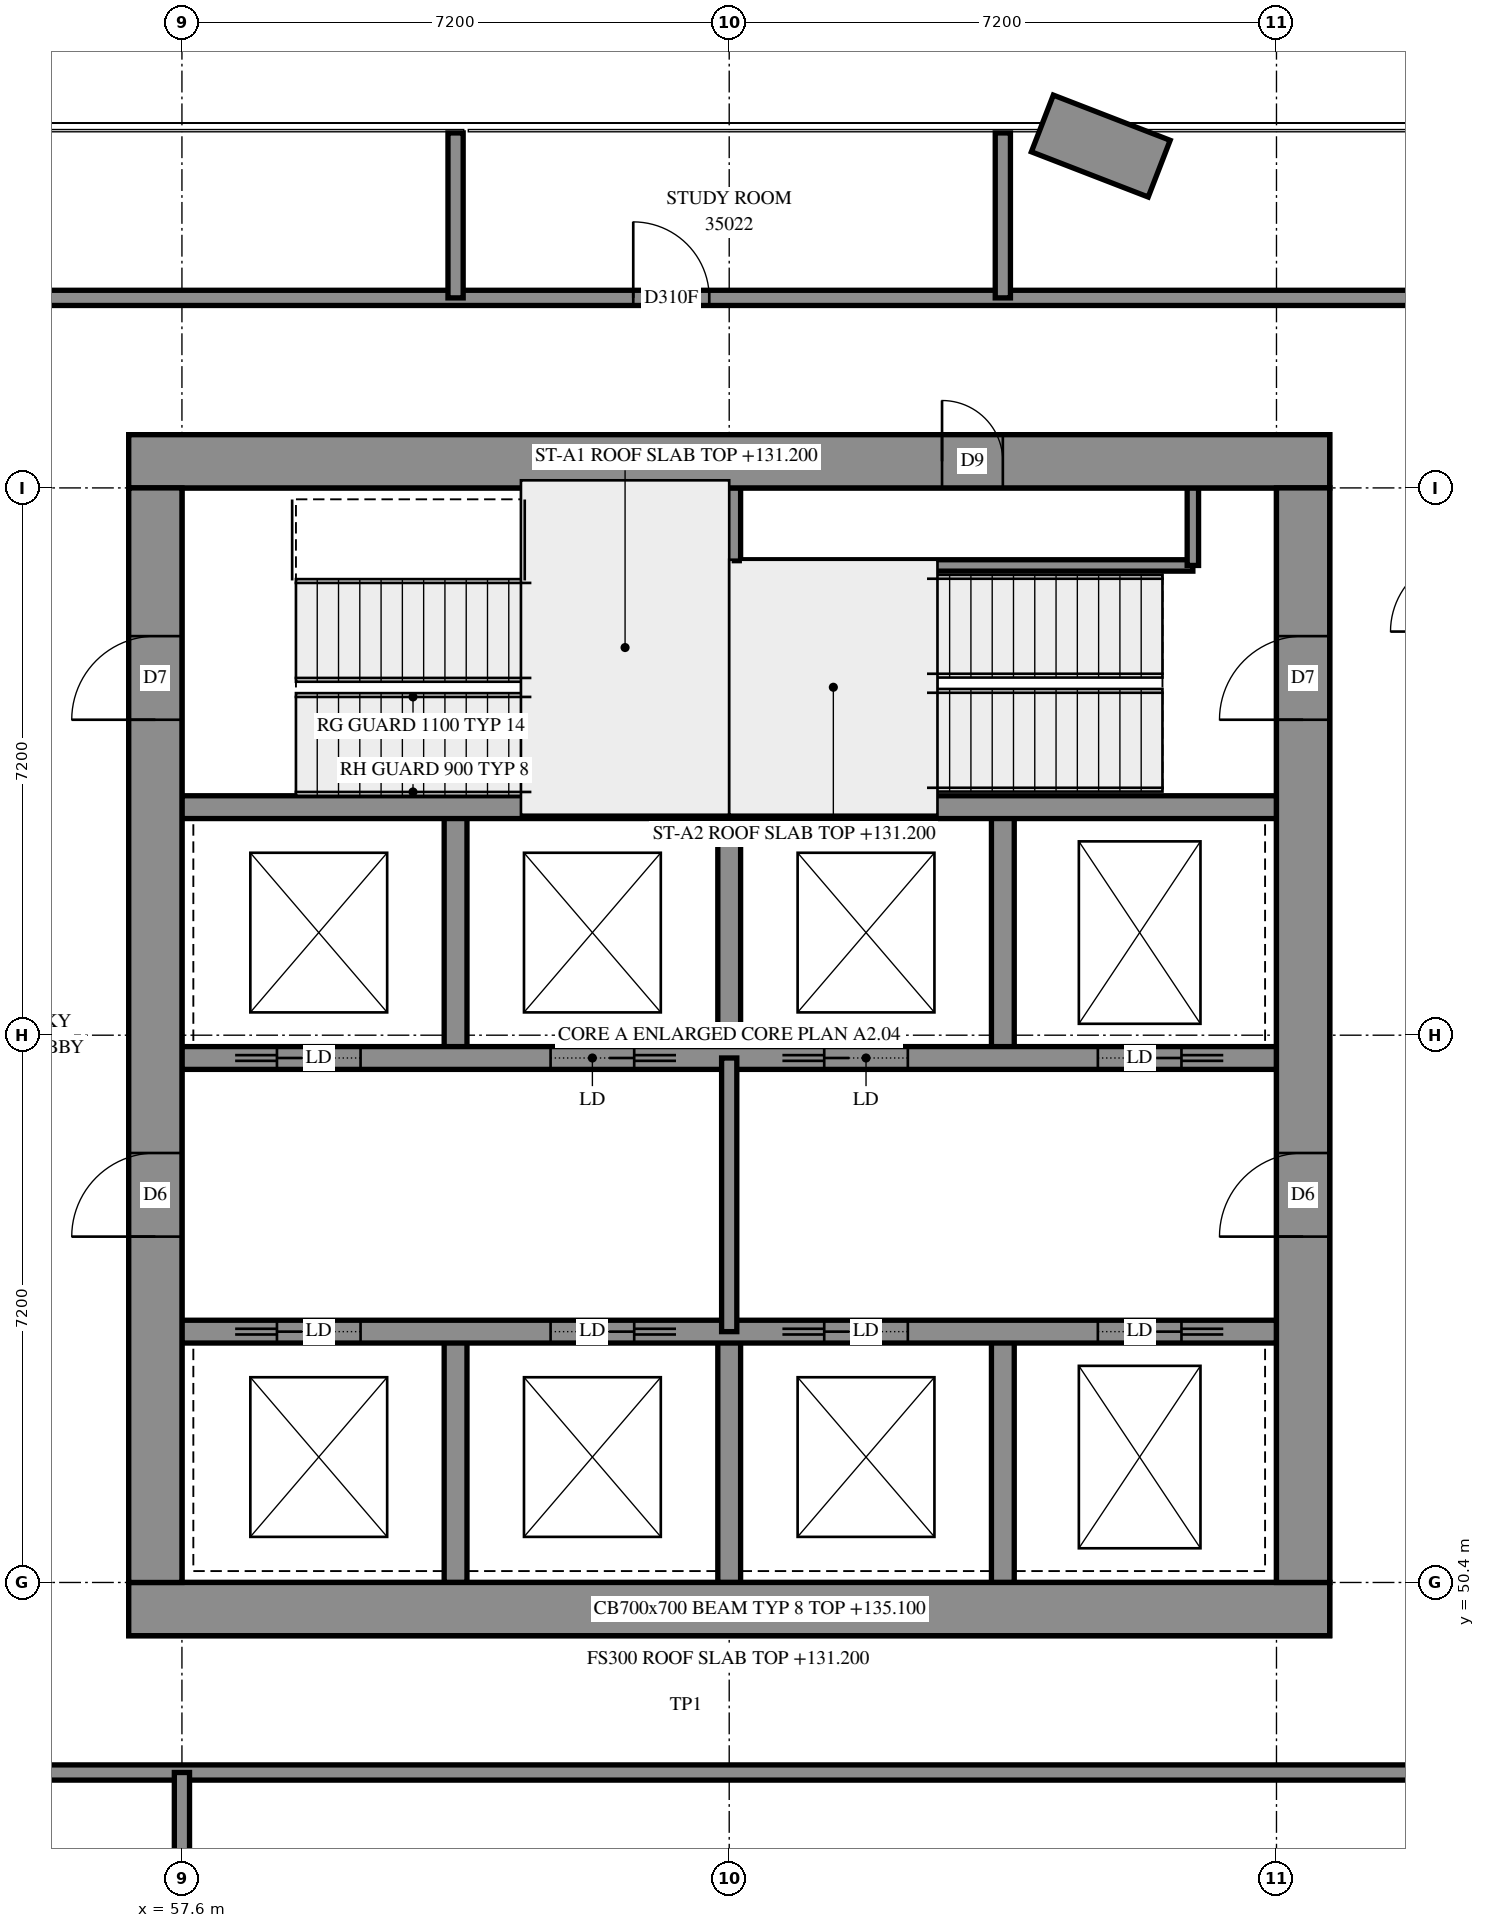
"""IFC4 building model, lengths in metres.
Left out: names, types, materials, properties, quantities, classifications, styles, units other than length and angle.
Written with IfcOpenShell. Run it as: python <this file> out.ifc"""

import sys

from ifc_helpers import new_model, si_unit, direction, frame, frame_2d, origin, place, context, subcontext, project, spatial, rectangle, extrude, element, fill, save


model = new_model("IFC4")
c1 = context("Model", 3, precision=1e-05, world=origin(), true_north=direction((0.0, 1.0)))
c2 = subcontext(c1, "Body", "Model", "MODEL_VIEW")
j1 = project(units=[si_unit("LENGTHUNIT", "METRE"), si_unit("PLANEANGLEUNIT", "RADIAN")], contexts=[c1])
p1 = place(None, origin())
s1 = spatial("IfcSite", under=j1, at=p1, CompositionType="ELEMENT")
p2 = place(p1, origin())
s2 = spatial("IfcBuilding", under=s1, at=p2, CompositionType="ELEMENT")
p3 = place(p2, frame((0.0, 0.0, 131.2)))
s3 = spatial("IfcBuildingStorey", under=s2, at=p3, CompositionType="ELEMENT", Elevation=131.2)
p4 = place(p3, frame((56.9, 50.05, -0.3), z_axis=(0.0, 0.0, 1.0), x_axis=(1.0, 0.0, 0.0)))
e1 = element("IfcWall", 1, at=p4, inside=s3, PredefinedType="SHEAR", context=c2, shape_type="SweptSolid", body=[
    extrude(rectangle(XDim=15.8, YDim=0.7, at=frame_2d((7.9, 0.0))), origin(), (0.0, 0.0, 1.0), 3.5),
])
p5 = place(p3, frame((56.9, 65.15, -0.3), z_axis=(0.0, 0.0, 1.0), x_axis=(1.0, 0.0, 0.0)))
e2 = element("IfcWall", 2, at=p5, inside=s3, PredefinedType="SHEAR", context=c2, shape_type="SweptSolid", body=[
    extrude(rectangle(XDim=15.8, YDim=0.7, at=frame_2d((7.9, 0.0))), origin(), (0.0, 0.0, 1.0), 3.5),
])
p6 = place(p5, frame((10.7, 0.0, 0.3)))
e3 = element("IfcOpeningElement", 3, at=p6, cuts=e2, PredefinedType="OPENING", context=c2, shape_type="SweptSolid", body=[
    extrude(rectangle(XDim=0.8, YDim=2.1, at=frame_2d((0.4, 1.05))), frame((0.0, 0.36, 0.0), z_axis=(0.0, -1.0, 0.0), x_axis=(1.0, 0.0, 0.0)), (0.0, 0.0, 1.0), 0.72),
])
p7 = place(p3, frame((57.25, 50.4, -0.3), z_axis=(0.0, 0.0, 1.0), x_axis=(0.0, 1.0, 0.0)))
e4 = element("IfcWall", 4, at=p7, inside=s3, PredefinedType="SHEAR", context=c2, shape_type="SweptSolid", body=[
    extrude(rectangle(XDim=14.4, YDim=0.7, at=frame_2d((7.2, 0.0))), origin(), (0.0, 0.0, 1.0), 3.5),
])
p8 = place(p7, frame((4.55, 0.0, 0.3)))
e5 = element("IfcOpeningElement", 5, at=p8, cuts=e4, PredefinedType="OPENING", context=c2, shape_type="SweptSolid", body=[
    extrude(rectangle(XDim=1.1, YDim=2.1, at=frame_2d((0.55, 1.05))), frame((0.0, 0.36, 0.0), z_axis=(0.0, -1.0, 0.0), x_axis=(1.0, 0.0, 0.0)), (0.0, 0.0, 1.0), 0.72),
])
p9 = place(p7, frame((11.35, 0.0, 0.3)))
e6 = element("IfcOpeningElement", 6, at=p9, cuts=e4, PredefinedType="OPENING", context=c2, shape_type="SweptSolid", body=[
    extrude(rectangle(XDim=1.1, YDim=2.1, at=frame_2d((0.55, 1.05))), frame((0.0, 0.36, 0.0), z_axis=(0.0, -1.0, 0.0), x_axis=(1.0, 0.0, 0.0)), (0.0, 0.0, 1.0), 0.72),
])
p10 = place(p3, frame((72.35, 50.4, -0.3), z_axis=(0.0, 0.0, 1.0), x_axis=(0.0, 1.0, 0.0)))
e7 = element("IfcWall", 7, at=p10, inside=s3, PredefinedType="SHEAR", context=c2, shape_type="SweptSolid", body=[
    extrude(rectangle(XDim=14.4, YDim=0.7, at=frame_2d((7.2, 0.0))), origin(), (0.0, 0.0, 1.0), 3.5),
])
p11 = place(p10, frame((4.55, 0.0, 0.3)))
e8 = element("IfcOpeningElement", 8, at=p11, cuts=e7, PredefinedType="OPENING", context=c2, shape_type="SweptSolid", body=[
    extrude(rectangle(XDim=1.1, YDim=2.1, at=frame_2d((0.55, 1.05))), frame((0.0, 0.36, 0.0), z_axis=(0.0, -1.0, 0.0), x_axis=(1.0, 0.0, 0.0)), (0.0, 0.0, 1.0), 0.72),
])
p12 = place(p10, frame((11.35, 0.0, 0.3)))
e9 = element("IfcOpeningElement", 9, at=p12, cuts=e7, PredefinedType="OPENING", context=c2, shape_type="SweptSolid", body=[
    extrude(rectangle(XDim=1.1, YDim=2.1, at=frame_2d((0.55, 1.05))), frame((0.0, 0.36, 0.0), z_axis=(0.0, -1.0, 0.0), x_axis=(1.0, 0.0, 0.0)), (0.0, 0.0, 1.0), 0.72),
])
for number, where, z_axis, x_axis in (
    (10, (61.2, 50.4, 0.0), (0.0, 0.0, 1.0), (0.0, 1.0, 0.0)),
    (11, (61.2, 57.3, 0.0), (0.0, 0.0, 1.0), (0.0, 1.0, 0.0)),
    (12, (64.8, 50.4, 0.0), (0.0, 0.0, 1.0), (0.0, 1.0, 0.0)),
    (13, (64.8, 57.3, 0.0), (0.0, 0.0, 1.0), (0.0, 1.0, 0.0)),
    (14, (68.4, 50.4, 0.0), (0.0, 0.0, 1.0), (0.0, 1.0, 0.0)),
    (15, (68.4, 57.3, 0.0), (0.0, 0.0, 1.0), (0.0, 1.0, 0.0)),
):
    element("IfcWall", number, at=place(p3, frame(where, z_axis=z_axis, x_axis=x_axis)), inside=s3, PredefinedType="SOLIDWALL", context=c2, shape_type="SweptSolid", body=[
        extrude(rectangle(XDim=3.3, YDim=0.3, at=frame_2d((1.65, 0.0))), origin(), (0.0, 0.0, 1.0), 3.9),
    ])
p13 = place(p3, frame((57.6, 53.7, 0.0), z_axis=(0.0, 0.0, 1.0), x_axis=(1.0, 0.0, 0.0)))
e16 = element("IfcWall", 16, at=p13, inside=s3, PredefinedType="SOLIDWALL", context=c2, shape_type="SweptSolid", body=[
    extrude(rectangle(XDim=14.4, YDim=0.3, at=frame_2d((7.2, 0.0))), origin(), (0.0, 0.0, 1.0), 3.9),
])
p14 = place(p13, frame((1.25, 0.0, 0.0)))
e17 = element("IfcOpeningElement", 17, at=p14, cuts=e16, PredefinedType="OPENING", context=c2, shape_type="SweptSolid", body=[
    extrude(rectangle(XDim=1.1, YDim=2.1, at=frame_2d((0.55, 1.05))), frame((0.0, 0.16, 0.0), z_axis=(0.0, -1.0, 0.0), x_axis=(1.0, 0.0, 0.0)), (0.0, 0.0, 1.0), 0.32),
])
p15 = place(p13, frame((4.85, 0.0, 0.0)))
e18 = element("IfcOpeningElement", 18, at=p15, cuts=e16, PredefinedType="OPENING", context=c2, shape_type="SweptSolid", body=[
    extrude(rectangle(XDim=1.1, YDim=2.1, at=frame_2d((0.55, 1.05))), frame((0.0, 0.16, 0.0), z_axis=(0.0, -1.0, 0.0), x_axis=(1.0, 0.0, 0.0)), (0.0, 0.0, 1.0), 0.32),
])
p16 = place(p13, frame((8.45, 0.0, 0.0)))
e19 = element("IfcOpeningElement", 19, at=p16, cuts=e16, PredefinedType="OPENING", context=c2, shape_type="SweptSolid", body=[
    extrude(rectangle(XDim=1.1, YDim=2.1, at=frame_2d((0.55, 1.05))), frame((0.0, 0.16, 0.0), z_axis=(0.0, -1.0, 0.0), x_axis=(1.0, 0.0, 0.0)), (0.0, 0.0, 1.0), 0.32),
])
p17 = place(p13, frame((12.05, 0.0, 0.0)))
e20 = element("IfcOpeningElement", 20, at=p17, cuts=e16, PredefinedType="OPENING", context=c2, shape_type="SweptSolid", body=[
    extrude(rectangle(XDim=1.1, YDim=2.1, at=frame_2d((0.55, 1.05))), frame((0.0, 0.16, 0.0), z_axis=(0.0, -1.0, 0.0), x_axis=(1.0, 0.0, 0.0)), (0.0, 0.0, 1.0), 0.32),
])
p18 = place(p3, frame((57.6, 57.3, 0.0), z_axis=(0.0, 0.0, 1.0), x_axis=(1.0, 0.0, 0.0)))
e21 = element("IfcWall", 21, at=p18, inside=s3, PredefinedType="SOLIDWALL", context=c2, shape_type="SweptSolid", body=[
    extrude(rectangle(XDim=14.4, YDim=0.3, at=frame_2d((7.2, 0.0))), origin(), (0.0, 0.0, 1.0), 3.9),
])
p19 = place(p18, frame((1.25, 0.0, 0.0)))
e22 = element("IfcOpeningElement", 22, at=p19, cuts=e21, PredefinedType="OPENING", context=c2, shape_type="SweptSolid", body=[
    extrude(rectangle(XDim=1.1, YDim=2.1, at=frame_2d((0.55, 1.05))), frame((0.0, 0.16, 0.0), z_axis=(0.0, -1.0, 0.0), x_axis=(1.0, 0.0, 0.0)), (0.0, 0.0, 1.0), 0.32),
])
p20 = place(p18, frame((4.85, 0.0, 0.0)))
e23 = element("IfcOpeningElement", 23, at=p20, cuts=e21, PredefinedType="OPENING", context=c2, shape_type="SweptSolid", body=[
    extrude(rectangle(XDim=1.1, YDim=2.1, at=frame_2d((0.55, 1.05))), frame((0.0, 0.16, 0.0), z_axis=(0.0, -1.0, 0.0), x_axis=(1.0, 0.0, 0.0)), (0.0, 0.0, 1.0), 0.32),
])
p21 = place(p18, frame((8.45, 0.0, 0.0)))
e24 = element("IfcOpeningElement", 24, at=p21, cuts=e21, PredefinedType="OPENING", context=c2, shape_type="SweptSolid", body=[
    extrude(rectangle(XDim=1.1, YDim=2.1, at=frame_2d((0.55, 1.05))), frame((0.0, 0.16, 0.0), z_axis=(0.0, -1.0, 0.0), x_axis=(1.0, 0.0, 0.0)), (0.0, 0.0, 1.0), 0.32),
])
p22 = place(p18, frame((12.05, 0.0, 0.0)))
e25 = element("IfcOpeningElement", 25, at=p22, cuts=e21, PredefinedType="OPENING", context=c2, shape_type="SweptSolid", body=[
    extrude(rectangle(XDim=1.1, YDim=2.1, at=frame_2d((0.55, 1.05))), frame((0.0, 0.16, 0.0), z_axis=(0.0, -1.0, 0.0), x_axis=(1.0, 0.0, 0.0)), (0.0, 0.0, 1.0), 0.32),
])
for number, where, z_axis, x_axis in (
    (26, (57.6, 60.6, 0.0), (0.0, 0.0, 1.0), (1.0, 0.0, 0.0)),
    (27, (64.8, 60.6, 0.0), (0.0, 0.0, 1.0), (1.0, 0.0, 0.0)),
):
    element("IfcWall", number, at=place(p3, frame(where, z_axis=z_axis, x_axis=x_axis)), inside=s3, PredefinedType="SOLIDWALL", context=c2, shape_type="SweptSolid", body=[
        extrude(rectangle(XDim=7.2, YDim=0.3, at=frame_2d((3.6, 0.0))), origin(), (0.0, 0.0, 1.0), 3.9),
    ])
p23 = place(p3, frame((64.8, 60.6, 0.0), z_axis=(0.0, 0.0, 1.0), x_axis=(0.0, 1.0, 0.0)))
e28 = element("IfcWall", 28, at=p23, inside=s3, PredefinedType="SOLIDWALL", context=c2, shape_type="SweptSolid", body=[
    extrude(rectangle(XDim=4.2, YDim=0.3, at=frame_2d((2.1, 0.0))), origin(), (0.0, 0.0, 1.0), 3.9),
])
p24 = place(p3, frame((70.457, 69.0, 0.0), z_axis=(0.0, 0.0, 1.0), x_axis=(-0.9326148784, 0.3608732306, 0.0)))
e29 = element("IfcWall", 29, at=p24, inside=s3, PredefinedType="SOLIDWALL", context=c2, shape_type="SweptSolid", body=[
    extrude(rectangle(XDim=1.648, YDim=0.8, at=frame_2d((0.824, 0.0))), origin(), (0.0, 0.0, 1.0), 0.65),
])
p25 = place(p3, frame((64.95, 63.78, 0.0), z_axis=(0.0, 0.0, 1.0), x_axis=(1.0, 0.0, 0.0)))
e30 = element("IfcWall", 30, at=p25, inside=s3, PredefinedType="PARTITIONING", context=c2, shape_type="SweptSolid", body=[
    extrude(rectangle(XDim=5.95, YDim=0.15, at=frame_2d((2.975, 0.0))), origin(), (0.0, 0.0, 1.0), 3.9),
])
p26 = place(p3, frame((70.9, 63.78, 0.0), z_axis=(0.0, 0.0, 1.0), x_axis=(0.0, 1.0, 0.0)))
e31 = element("IfcWall", 31, at=p26, inside=s3, PredefinedType="PARTITIONING", context=c2, shape_type="SweptSolid", body=[
    extrude(rectangle(XDim=1.02, YDim=0.15, at=frame_2d((0.51, 0.0))), origin(), (0.0, 0.0, 1.0), 3.9),
])
p27 = place(p3, frame((64.8, 53.7, 0.0), z_axis=(0.0, 0.0, 1.0), x_axis=(0.0, 1.0, 0.0)))
e32 = element("IfcWall", 32, at=p27, inside=s3, PredefinedType="PARTITIONING", context=c2, shape_type="SweptSolid", body=[
    extrude(rectangle(XDim=3.6, YDim=0.2, at=frame_2d((1.8, 0.0))), origin(), (0.0, 0.0, 1.0), 3.9),
])
p28 = place(p3, frame((55.102, 67.3, 0.0), z_axis=(0.0, 0.0, 1.0), x_axis=(1.0, 0.0, 0.0)))
e33 = element("IfcWall", 33, at=p28, inside=s3, PredefinedType="PARTITIONING", context=c2, shape_type="SweptSolid", body=[
    extrude(rectangle(XDim=19.398, YDim=0.2, at=frame_2d((9.699, 0.0))), origin(), (0.0, 0.0, 1.0), 3.9),
])
p29 = place(p28, frame((8.435, 0.0, 0.0)))
e34 = element("IfcOpeningElement", 34, at=p29, cuts=e33, PredefinedType="OPENING", context=c2, shape_type="SweptSolid", body=[
    extrude(rectangle(XDim=1.0, YDim=2.1, at=frame_2d((0.5, 1.05))), frame((0.0, 0.11, 0.0), z_axis=(0.0, -1.0, 0.0), x_axis=(1.0, 0.0, 0.0)), (0.0, 0.0, 1.0), 0.22),
])
p30 = place(p3, frame((55.1, 47.9, 0.0), z_axis=(0.0, 0.0, 1.0), x_axis=(1.0, 0.0, 0.0)))
e35 = element("IfcWall", 35, at=p30, inside=s3, PredefinedType="PARTITIONING", context=c2, shape_type="SweptSolid", body=[
    extrude(rectangle(XDim=19.208, YDim=0.2, at=frame_2d((9.604, 0.0))), origin(), (0.0, 0.0, 1.0), 3.9),
])
for number, where, z_axis, x_axis in (
    (36, (57.6, 45.73, 0.0), (0.0, 0.0, 1.0), (0.0, 1.0, 0.0)),
    (37, (61.2, 67.3, 0.0), (0.0, 0.0, 1.0), (0.0, 1.0, 0.0)),
    (38, (68.4, 67.3, 0.0), (0.0, 0.0, 1.0), (0.0, 1.0, 0.0)),
):
    element("IfcWall", number, at=place(p3, frame(where, z_axis=z_axis, x_axis=x_axis)), inside=s3, PredefinedType="PARTITIONING", context=c2, shape_type="SweptSolid", body=[
        extrude(rectangle(XDim=2.17, YDim=0.2, at=frame_2d((1.085, 0.0))), origin(), (0.0, 0.0, 1.0), 3.9),
    ])
p31 = place(p6, origin())
e39 = element("IfcDoor", 39, at=p31, inside=s3, OperationType="SINGLE_SWING_RIGHT", PredefinedType="DOOR", context=c2, shape_type="SweptSolid", body=[
    extrude(rectangle(XDim=0.8, YDim=2.1, at=frame_2d((0.4, 1.05))), frame((0.0, -0.29, 0.0), z_axis=(0.0, -1.0, 0.0), x_axis=(1.0, 0.0, 0.0)), (0.0, 0.0, 1.0), 0.05),
])
fill(e3, e39)
p32 = place(p8, origin())
e40 = element("IfcDoor", 40, at=p32, inside=s3, OperationType="DOUBLE_DOOR_SINGLE_SWING", PredefinedType="DOOR", context=c2, shape_type="SweptSolid", body=[
    extrude(rectangle(XDim=1.1, YDim=2.1, at=frame_2d((0.55, 1.05))), frame((0.0, 0.025, 0.0), z_axis=(0.0, -1.0, 0.0), x_axis=(1.0, 0.0, 0.0)), (0.0, 0.0, 1.0), 0.05),
])
fill(e5, e40)
p33 = place(p11, origin())
e41 = element("IfcDoor", 41, at=p33, inside=s3, OperationType="DOUBLE_DOOR_SINGLE_SWING", PredefinedType="DOOR", context=c2, shape_type="SweptSolid", body=[
    extrude(rectangle(XDim=1.1, YDim=2.1, at=frame_2d((0.55, 1.05))), frame((0.0, 0.025, 0.0), z_axis=(0.0, -1.0, 0.0), x_axis=(1.0, 0.0, 0.0)), (0.0, 0.0, 1.0), 0.05),
])
fill(e8, e41)
p34 = place(p9, origin())
e42 = element("IfcDoor", 42, at=p34, inside=s3, OperationType="SINGLE_SWING_LEFT", PredefinedType="DOOR", context=c2, shape_type="SweptSolid", body=[
    extrude(rectangle(XDim=1.1, YDim=2.1, at=frame_2d((0.55, 1.05))), frame((0.0, 0.025, 0.0), z_axis=(0.0, -1.0, 0.0), x_axis=(1.0, 0.0, 0.0)), (0.0, 0.0, 1.0), 0.05),
])
fill(e6, e42)
p35 = place(p12, origin())
e43 = element("IfcDoor", 43, at=p35, inside=s3, OperationType="SINGLE_SWING_RIGHT", PredefinedType="DOOR", context=c2, shape_type="SweptSolid", body=[
    extrude(rectangle(XDim=1.1, YDim=2.1, at=frame_2d((0.55, 1.05))), frame((0.0, 0.025, 0.0), z_axis=(0.0, -1.0, 0.0), x_axis=(1.0, 0.0, 0.0)), (0.0, 0.0, 1.0), 0.05),
])
fill(e9, e43)
p36 = place(p14, origin())
e44 = element("IfcDoor", 44, at=p36, inside=s3, OperationType="SLIDING_TO_LEFT", PredefinedType="DOOR", context=c2, shape_type="SweptSolid", body=[
    extrude(rectangle(XDim=1.1, YDim=2.1, at=frame_2d((0.55, 1.05))), frame((0.0, 0.025, 0.0), z_axis=(0.0, -1.0, 0.0), x_axis=(1.0, 0.0, 0.0)), (0.0, 0.0, 1.0), 0.05),
])
fill(e17, e44)
p37 = place(p15, origin())
e45 = element("IfcDoor", 45, at=p37, inside=s3, OperationType="SLIDING_TO_RIGHT", PredefinedType="DOOR", context=c2, shape_type="SweptSolid", body=[
    extrude(rectangle(XDim=1.1, YDim=2.1, at=frame_2d((0.55, 1.05))), frame((0.0, 0.025, 0.0), z_axis=(0.0, -1.0, 0.0), x_axis=(1.0, 0.0, 0.0)), (0.0, 0.0, 1.0), 0.05),
])
fill(e18, e45)
p38 = place(p16, origin())
e46 = element("IfcDoor", 46, at=p38, inside=s3, OperationType="SLIDING_TO_LEFT", PredefinedType="DOOR", context=c2, shape_type="SweptSolid", body=[
    extrude(rectangle(XDim=1.1, YDim=2.1, at=frame_2d((0.55, 1.05))), frame((0.0, 0.025, 0.0), z_axis=(0.0, -1.0, 0.0), x_axis=(1.0, 0.0, 0.0)), (0.0, 0.0, 1.0), 0.05),
])
fill(e19, e46)
p39 = place(p17, origin())
e47 = element("IfcDoor", 47, at=p39, inside=s3, OperationType="SLIDING_TO_RIGHT", PredefinedType="DOOR", context=c2, shape_type="SweptSolid", body=[
    extrude(rectangle(XDim=1.1, YDim=2.1, at=frame_2d((0.55, 1.05))), frame((0.0, 0.025, 0.0), z_axis=(0.0, -1.0, 0.0), x_axis=(1.0, 0.0, 0.0)), (0.0, 0.0, 1.0), 0.05),
])
fill(e20, e47)
p40 = place(p19, origin())
e48 = element("IfcDoor", 48, at=p40, inside=s3, OperationType="SLIDING_TO_LEFT", PredefinedType="DOOR", context=c2, shape_type="SweptSolid", body=[
    extrude(rectangle(XDim=1.1, YDim=2.1, at=frame_2d((0.55, 1.05))), frame((0.0, 0.025, 0.0), z_axis=(0.0, -1.0, 0.0), x_axis=(1.0, 0.0, 0.0)), (0.0, 0.0, 1.0), 0.05),
])
fill(e22, e48)
p41 = place(p20, origin())
e49 = element("IfcDoor", 49, at=p41, inside=s3, OperationType="SLIDING_TO_RIGHT", PredefinedType="DOOR", context=c2, shape_type="SweptSolid", body=[
    extrude(rectangle(XDim=1.1, YDim=2.1, at=frame_2d((0.55, 1.05))), frame((0.0, 0.025, 0.0), z_axis=(0.0, -1.0, 0.0), x_axis=(1.0, 0.0, 0.0)), (0.0, 0.0, 1.0), 0.05),
])
fill(e23, e49)
p42 = place(p21, origin())
e50 = element("IfcDoor", 50, at=p42, inside=s3, OperationType="SLIDING_TO_LEFT", PredefinedType="DOOR", context=c2, shape_type="SweptSolid", body=[
    extrude(rectangle(XDim=1.1, YDim=2.1, at=frame_2d((0.55, 1.05))), frame((0.0, 0.025, 0.0), z_axis=(0.0, -1.0, 0.0), x_axis=(1.0, 0.0, 0.0)), (0.0, 0.0, 1.0), 0.05),
])
fill(e24, e50)
p43 = place(p22, origin())
e51 = element("IfcDoor", 51, at=p43, inside=s3, OperationType="SLIDING_TO_RIGHT", PredefinedType="DOOR", context=c2, shape_type="SweptSolid", body=[
    extrude(rectangle(XDim=1.1, YDim=2.1, at=frame_2d((0.55, 1.05))), frame((0.0, 0.025, 0.0), z_axis=(0.0, -1.0, 0.0), x_axis=(1.0, 0.0, 0.0)), (0.0, 0.0, 1.0), 0.05),
])
fill(e25, e51)
p44 = place(p29, origin())
e52 = element("IfcDoor", 52, at=p44, inside=s3, OperationType="SINGLE_SWING_LEFT", PredefinedType="DOOR", context=c2, shape_type="SweptSolid", body=[
    extrude(rectangle(XDim=1.0, YDim=2.1, at=frame_2d((0.5, 1.05))), frame((0.0, 0.025, 0.0), z_axis=(0.0, -1.0, 0.0), x_axis=(1.0, 0.0, 0.0)), (0.0, 0.0, 1.0), 0.05),
])
fill(e34, e52)
save(model, sys.argv[1])
